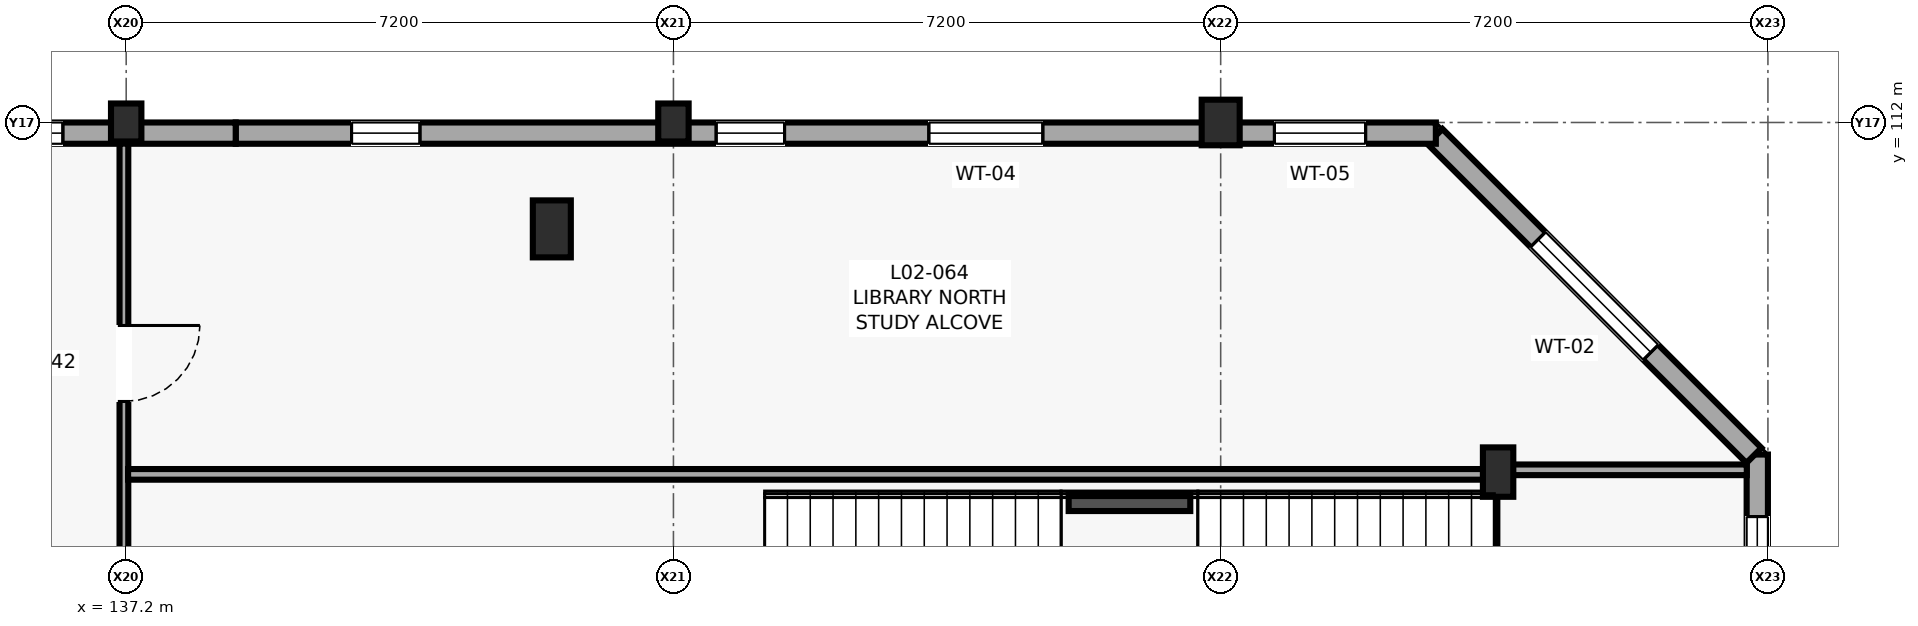
"""IFC4 building model, lengths in metres.
Left out: names, types, materials, properties, quantities, classifications, styles, units other than length and angle.
Written with IfcOpenShell. Run it as: python <this file> out.ifc"""

import sys

from ifc_helpers import new_model, si_unit, direction, frame, frame_2d, origin, origin_2d, place, context, subcontext, project, spatial, rectangle, extrude, element, fill, save


model = new_model("IFC4")
c1 = context("Model", 3, precision=1e-05, world=origin(), true_north=direction((0.0, 1.0)))
c2 = subcontext(c1, "Body", "Model", "MODEL_VIEW")
j1 = project(units=[si_unit("LENGTHUNIT", "METRE"), si_unit("PLANEANGLEUNIT", "RADIAN")], contexts=[c1])
p1 = place(None, origin())
s1 = spatial("IfcSite", under=j1, at=p1, CompositionType="ELEMENT")
p2 = place(p1, origin())
s2 = spatial("IfcBuilding", under=s1, at=p2, CompositionType="ELEMENT")
p3 = place(p2, frame((0.0, 0.0, 8.2)))
s3 = spatial("IfcBuildingStorey", under=s2, at=p3, CompositionType="ELEMENT", Elevation=8.2)
p4 = place(p3, frame((137.2, 112.0, 0.0), z_axis=(0.0, 0.0, 1.0), x_axis=(1.0, 0.0, 0.0)))
e1 = element("IfcColumn", 1, at=p4, inside=s3, PredefinedType="PILASTER", context=c2, shape_type="SweptSolid", body=[
    extrude(rectangle(XDim=0.4, YDim=0.5, at=origin_2d()), origin(), (0.0, 0.0, 1.0), 4.0),
])
p5 = place(p3, frame((142.8, 110.6, 0.0), z_axis=(0.0, 0.0, 1.0), x_axis=(1.0, 0.0, 0.0)))
e2 = element("IfcColumn", 2, at=p5, inside=s3, PredefinedType="COLUMN", context=c2, shape_type="SweptSolid", body=[
    extrude(rectangle(XDim=0.5, YDim=0.75, at=origin_2d()), origin(), (0.0, 0.0, 1.0), 4.0),
])
p6 = place(p3, frame((144.4, 112.0, 0.0), z_axis=(0.0, 0.0, 1.0), x_axis=(1.0, 0.0, 0.0)))
e3 = element("IfcColumn", 3, at=p6, inside=s3, PredefinedType="PILASTER", context=c2, shape_type="SweptSolid", body=[
    extrude(rectangle(XDim=0.4, YDim=0.5, at=origin_2d()), origin(), (0.0, 0.0, 1.0), 4.0),
])
p7 = place(p3, frame((151.6, 112.0, 0.0), z_axis=(0.0, 0.0, 1.0), x_axis=(1.0, 0.0, 0.0)))
e4 = element("IfcColumn", 4, at=p7, inside=s3, PredefinedType="PILASTER", context=c2, shape_type="SweptSolid", body=[
    extrude(rectangle(XDim=0.5, YDim=0.6, at=origin_2d()), origin(), (0.0, 0.0, 1.0), 4.0),
])
p8 = place(p3, frame((155.25, 107.4, 0.0), z_axis=(0.0, 0.0, 1.0), x_axis=(1.0, 0.0, 0.0)))
e5 = element("IfcColumn", 5, at=p8, inside=s3, PredefinedType="COLUMN", context=c2, shape_type="SweptSolid", body=[
    extrude(rectangle(XDim=0.4, YDim=0.65, at=origin_2d()), origin(), (0.0, 0.0, 1.0), 4.0),
])
p9 = place(p3, frame((158.66, 100.769, 0.0), z_axis=(0.0, 0.0, 1.0), x_axis=(0.0, 1.0, 0.0)))
e6 = element("IfcWall", 6, at=p9, inside=s3, PredefinedType="SOLIDWALL", context=c2, shape_type="SweptSolid", body=[
    extrude(rectangle(XDim=6.862, YDim=0.28, at=frame_2d((3.431, 0.0))), origin(), (0.0, 0.0, 1.0), 3.78),
])
p10 = place(p9, frame((0.64, 0.0, 0.85)))
e7 = element("IfcOpeningElement", 7, at=p10, cuts=e6, PredefinedType="OPENING", context=c2, shape_type="SweptSolid", body=[
    extrude(rectangle(XDim=2.15, YDim=1.95, at=frame_2d((1.075, 0.975))), frame((0.0, 0.15, 0.0), z_axis=(0.0, -1.0, 0.0), x_axis=(1.0, 0.0, 0.0)), (0.0, 0.0, 1.0), 0.3),
])
p11 = place(p9, frame((4.246, 0.0, 0.85)))
e8 = element("IfcOpeningElement", 8, at=p11, cuts=e6, PredefinedType="OPENING", context=c2, shape_type="SweptSolid", body=[
    extrude(rectangle(XDim=1.8, YDim=1.8, at=frame_2d((0.9, 0.9))), frame((0.0, 0.15, 0.0), z_axis=(0.0, -1.0, 0.0), x_axis=(1.0, 0.0, 0.0)), (0.0, 0.0, 1.0), 0.3),
])
p12 = place(p3, frame((158.616, 107.619, 0.0), z_axis=(0.0, 0.0, 1.0), x_axis=(-0.707106781187, 0.707106781187, 0.0)))
e9 = element("IfcWall", 9, at=p12, inside=s3, PredefinedType="SOLIDWALL", context=c2, shape_type="SweptSolid", body=[
    extrude(rectangle(XDim=5.936, YDim=0.28, at=frame_2d((2.968, 0.0))), origin(), (0.0, 0.0, 1.0), 3.78),
])
p13 = place(p12, frame((1.918, 0.0, 0.85)))
e10 = element("IfcOpeningElement", 10, at=p13, cuts=e9, PredefinedType="OPENING", context=c2, shape_type="SweptSolid", body=[
    extrude(rectangle(XDim=2.1, YDim=1.8, at=frame_2d((1.05, 0.9))), frame((0.0, 0.15, 0.0), z_axis=(0.0, -1.0, 0.0), x_axis=(1.0, 0.0, 0.0)), (0.0, 0.0, 1.0), 0.3),
])
p14 = place(p3, frame((154.431, 111.86, 0.0), z_axis=(0.0, 0.0, 1.0), x_axis=(-1.0, 0.0, 0.0)))
e11 = element("IfcWall", 11, at=p14, inside=s3, PredefinedType="SOLIDWALL", context=c2, shape_type="SweptSolid", body=[
    extrude(rectangle(XDim=15.79, YDim=0.28, at=frame_2d((7.895, 0.0))), origin(), (0.0, 0.0, 1.0), 2.815),
])
p15 = place(p14, frame((0.924, 0.0, 0.85)))
e12 = element("IfcOpeningElement", 12, at=p15, cuts=e11, PredefinedType="OPENING", context=c2, shape_type="SweptSolid", body=[
    extrude(rectangle(XDim=1.2, YDim=1.65, at=frame_2d((0.6, 0.825))), frame((0.0, 0.15, 0.0), z_axis=(0.0, -1.0, 0.0), x_axis=(1.0, 0.0, 0.0)), (0.0, 0.0, 1.0), 0.3),
])
p16 = place(p14, frame((5.171, 0.0, 0.85)))
e13 = element("IfcOpeningElement", 13, at=p16, cuts=e11, PredefinedType="OPENING", context=c2, shape_type="SweptSolid", body=[
    extrude(rectangle(XDim=1.5, YDim=1.65, at=frame_2d((0.75, 0.825))), frame((0.0, 0.15, 0.0), z_axis=(0.0, -1.0, 0.0), x_axis=(1.0, 0.0, 0.0)), (0.0, 0.0, 1.0), 0.3),
])
p17 = place(p14, frame((8.569, 0.0, 1.05)))
e14 = element("IfcOpeningElement", 14, at=p17, cuts=e11, PredefinedType="OPENING", context=c2, shape_type="SweptSolid", body=[
    extrude(rectangle(XDim=0.9, YDim=1.5, at=frame_2d((0.45, 0.75))), frame((0.0, 0.15, 0.0), z_axis=(0.0, -1.0, 0.0), x_axis=(1.0, 0.0, 0.0)), (0.0, 0.0, 1.0), 0.3),
])
p18 = place(p14, frame((13.366, 0.0, 1.05)))
e15 = element("IfcOpeningElement", 15, at=p18, cuts=e11, PredefinedType="OPENING", context=c2, shape_type="SweptSolid", body=[
    extrude(rectangle(XDim=0.9, YDim=1.5, at=frame_2d((0.45, 0.75))), frame((0.0, 0.15, 0.0), z_axis=(0.0, -1.0, 0.0), x_axis=(1.0, 0.0, 0.0)), (0.0, 0.0, 1.0), 0.3),
])
p19 = place(p3, frame((138.641, 111.86, 0.0), z_axis=(0.0, 0.0, 1.0), x_axis=(-1.0, 0.0, 0.0)))
e16 = element("IfcWall", 16, at=p19, inside=s3, PredefinedType="SOLIDWALL", context=c2, shape_type="SweptSolid", body=[
    extrude(rectangle(XDim=15.791, YDim=0.28, at=frame_2d((7.896, 0.0))), origin(), (0.0, 0.0, 1.0), 2.865),
])
p20 = place(p19, frame((2.274, 0.0, 0.65)))
e17 = element("IfcOpeningElement", 17, at=p20, cuts=e16, PredefinedType="OPENING", context=c2, shape_type="SweptSolid", body=[
    extrude(rectangle(XDim=1.1, YDim=2.1, at=frame_2d((0.55, 1.05))), frame((0.0, 0.15, 0.0), z_axis=(0.0, -1.0, 0.0), x_axis=(1.0, 0.0, 0.0)), (0.0, 0.0, 1.0), 0.3),
])
p21 = place(p19, frame((5.272, 0.0, 1.05)))
e18 = element("IfcOpeningElement", 18, at=p21, cuts=e16, PredefinedType="OPENING", context=c2, shape_type="SweptSolid", body=[
    extrude(rectangle(XDim=1.3, YDim=1.6, at=frame_2d((0.65, 0.8))), frame((0.0, 0.15, 0.0), z_axis=(0.0, -1.0, 0.0), x_axis=(1.0, 0.0, 0.0)), (0.0, 0.0, 1.0), 0.3),
])
p22 = place(p3, frame((149.6, 107.0, 0.0), z_axis=(0.0, 0.0, 1.0), x_axis=(1.0, 0.0, 0.0)))
e19 = element("IfcWall", 19, at=p22, inside=s3, PredefinedType="SHEAR", context=c2, shape_type="SweptSolid", body=[
    extrude(rectangle(XDim=1.6, YDim=0.225, at=frame_2d((0.8, 0.0))), origin(), (0.0, 0.0, 1.0), 1.81),
])
p23 = place(p3, frame((137.17, 103.886, 0.0), z_axis=(0.0, 0.0, 1.0), x_axis=(0.0, 1.0, 0.0)))
e20 = element("IfcWall", 20, at=p23, inside=s3, PredefinedType="PARTITIONING", context=c2, shape_type="SweptSolid", body=[
    extrude(rectangle(XDim=7.836, YDim=0.115, at=frame_2d((3.918, 0.0))), origin(), (0.0, 0.0, 1.0), 3.115),
])
p24 = place(p23, frame((4.443, 0.0, 0.0)))
e21 = element("IfcOpeningElement", 21, at=p24, cuts=e20, PredefinedType="OPENING", context=c2, shape_type="SweptSolid", body=[
    extrude(rectangle(XDim=1.0, YDim=2.1, at=frame_2d((0.5, 1.05))), frame((0.0, 0.067, 0.0), z_axis=(0.0, -1.0, 0.0), x_axis=(1.0, 0.0, 0.0)), (0.0, 0.0, 1.0), 0.135),
])
p25 = place(p3, frame((155.17, 98.498, 0.0), z_axis=(0.0, 0.0, 1.0), x_axis=(0.0, 1.0, 0.0)))
e22 = element("IfcWall", 22, at=p25, inside=s3, PredefinedType="PARTITIONING", context=c2, shape_type="SweptSolid", body=[
    extrude(rectangle(XDim=8.872, YDim=0.14, at=frame_2d((4.436, 0.0))), origin(), (0.0, 0.0, 1.0), 3.165),
])
p26 = place(p25, frame((3.611, 0.0, 0.0)))
e23 = element("IfcOpeningElement", 23, at=p26, cuts=e22, PredefinedType="OPENING", context=c2, shape_type="SweptSolid", body=[
    extrude(rectangle(XDim=1.65, YDim=2.32, at=frame_2d((0.825, 1.16))), frame((0.0, 0.08, 0.0), z_axis=(0.0, -1.0, 0.0), x_axis=(1.0, 0.0, 0.0)), (0.0, 0.0, 1.0), 0.16),
])
p27 = place(p25, frame((5.961, 0.0, 1.05)))
e24 = element("IfcOpeningElement", 24, at=p27, cuts=e22, PredefinedType="OPENING", context=c2, shape_type="SweptSolid", body=[
    extrude(rectangle(XDim=1.6, YDim=1.1, at=frame_2d((0.8, 0.55))), frame((0.0, 0.08, 0.0), z_axis=(0.0, -1.0, 0.0), x_axis=(1.0, 0.0, 0.0)), (0.0, 0.0, 1.0), 0.16),
])
p28 = place(p3, frame((155.102, 107.37, 0.0), z_axis=(0.0, 0.0, 1.0), x_axis=(-1.0, 0.0, 0.0)))
e25 = element("IfcWall", 25, at=p28, inside=s3, PredefinedType="PARTITIONING", context=c2, shape_type="SweptSolid", body=[
    extrude(rectangle(XDim=17.877, YDim=0.14, at=frame_2d((8.938, 0.0))), origin(), (0.0, 0.0, 1.0), 3.78),
])
p29 = place(p3, frame((155.17, 107.43, 0.0), z_axis=(0.0, 0.0, 1.0), x_axis=(1.0, 0.0, 0.0)))
e26 = element("IfcWall", 26, at=p29, inside=s3, PredefinedType="PARTITIONING", context=c2, shape_type="SweptSolid", body=[
    extrude(rectangle(XDim=3.352, YDim=0.14, at=frame_2d((1.676, 0.0))), origin(), (0.0, 0.0, 1.0), 3.715),
])
p30 = place(p11, origin())
e27 = element("IfcWindow", 27, at=p30, inside=s3, PartitioningType="SINGLE_PANEL", PredefinedType="WINDOW", context=c2, shape_type="SweptSolid", body=[
    extrude(rectangle(XDim=1.8, YDim=1.8, at=frame_2d((0.9, 0.9))), frame((0.0, 0.03, 0.0), z_axis=(0.0, -1.0, 0.0), x_axis=(1.0, 0.0, 0.0)), (0.0, 0.0, 1.0), 0.06),
])
fill(e8, e27)
p31 = place(p13, origin())
e28 = element("IfcWindow", 28, at=p31, inside=s3, PartitioningType="SINGLE_PANEL", PredefinedType="WINDOW", context=c2, shape_type="SweptSolid", body=[
    extrude(rectangle(XDim=2.1, YDim=1.8, at=frame_2d((1.05, 0.9))), frame((0.0, 0.03, 0.0), z_axis=(0.0, -1.0, 0.0), x_axis=(1.0, 0.0, 0.0)), (0.0, 0.0, 1.0), 0.06),
])
fill(e10, e28)
p32 = place(p15, origin())
e29 = element("IfcWindow", 29, at=p32, inside=s3, PartitioningType="SINGLE_PANEL", PredefinedType="WINDOW", context=c2, shape_type="SweptSolid", body=[
    extrude(rectangle(XDim=1.2, YDim=1.65, at=frame_2d((0.6, 0.825))), frame((0.0, 0.03, 0.0), z_axis=(0.0, -1.0, 0.0), x_axis=(1.0, 0.0, 0.0)), (0.0, 0.0, 1.0), 0.06),
])
fill(e12, e29)
p33 = place(p16, origin())
e30 = element("IfcWindow", 30, at=p33, inside=s3, PartitioningType="SINGLE_PANEL", PredefinedType="WINDOW", context=c2, shape_type="SweptSolid", body=[
    extrude(rectangle(XDim=1.5, YDim=1.65, at=frame_2d((0.75, 0.825))), frame((0.0, 0.03, 0.0), z_axis=(0.0, -1.0, 0.0), x_axis=(1.0, 0.0, 0.0)), (0.0, 0.0, 1.0), 0.06),
])
fill(e13, e30)
p34 = place(p17, origin())
e31 = element("IfcWindow", 31, at=p34, inside=s3, PartitioningType="SINGLE_PANEL", PredefinedType="WINDOW", context=c2, shape_type="SweptSolid", body=[
    extrude(rectangle(XDim=0.9, YDim=1.5, at=frame_2d((0.45, 0.75))), frame((0.0, 0.03, 0.0), z_axis=(0.0, -1.0, 0.0), x_axis=(1.0, 0.0, 0.0)), (0.0, 0.0, 1.0), 0.06),
])
fill(e14, e31)
p35 = place(p18, origin())
e32 = element("IfcWindow", 32, at=p35, inside=s3, PartitioningType="SINGLE_PANEL", PredefinedType="WINDOW", context=c2, shape_type="SweptSolid", body=[
    extrude(rectangle(XDim=0.9, YDim=1.5, at=frame_2d((0.45, 0.75))), frame((0.0, 0.03, 0.0), z_axis=(0.0, -1.0, 0.0), x_axis=(1.0, 0.0, 0.0)), (0.0, 0.0, 1.0), 0.06),
])
fill(e15, e32)
p36 = place(p20, origin())
e33 = element("IfcWindow", 33, at=p36, inside=s3, PartitioningType="SINGLE_PANEL", PredefinedType="WINDOW", context=c2, shape_type="SweptSolid", body=[
    extrude(rectangle(XDim=1.1, YDim=2.1, at=frame_2d((0.55, 1.05))), frame((0.0, 0.03, 0.0), z_axis=(0.0, -1.0, 0.0), x_axis=(1.0, 0.0, 0.0)), (0.0, 0.0, 1.0), 0.06),
])
fill(e17, e33)
p37 = place(p24, frame((1.0, 0.0, 0.0), z_axis=(0.0, 0.0, 1.0), x_axis=(-1.0, 0.0, 0.0)))
e34 = element("IfcDoor", 34, at=p37, inside=s3, OperationType="SINGLE_SWING_RIGHT", PredefinedType="DOOR", context=c2, shape_type="SweptSolid", body=[
    extrude(rectangle(XDim=1.0, YDim=2.1, at=frame_2d((0.5, 1.05))), frame((0.0, 0.025, 0.0), z_axis=(0.0, -1.0, 0.0), x_axis=(1.0, 0.0, 0.0)), (0.0, 0.0, 1.0), 0.05),
])
fill(e21, e34)
save(model, sys.argv[1])
